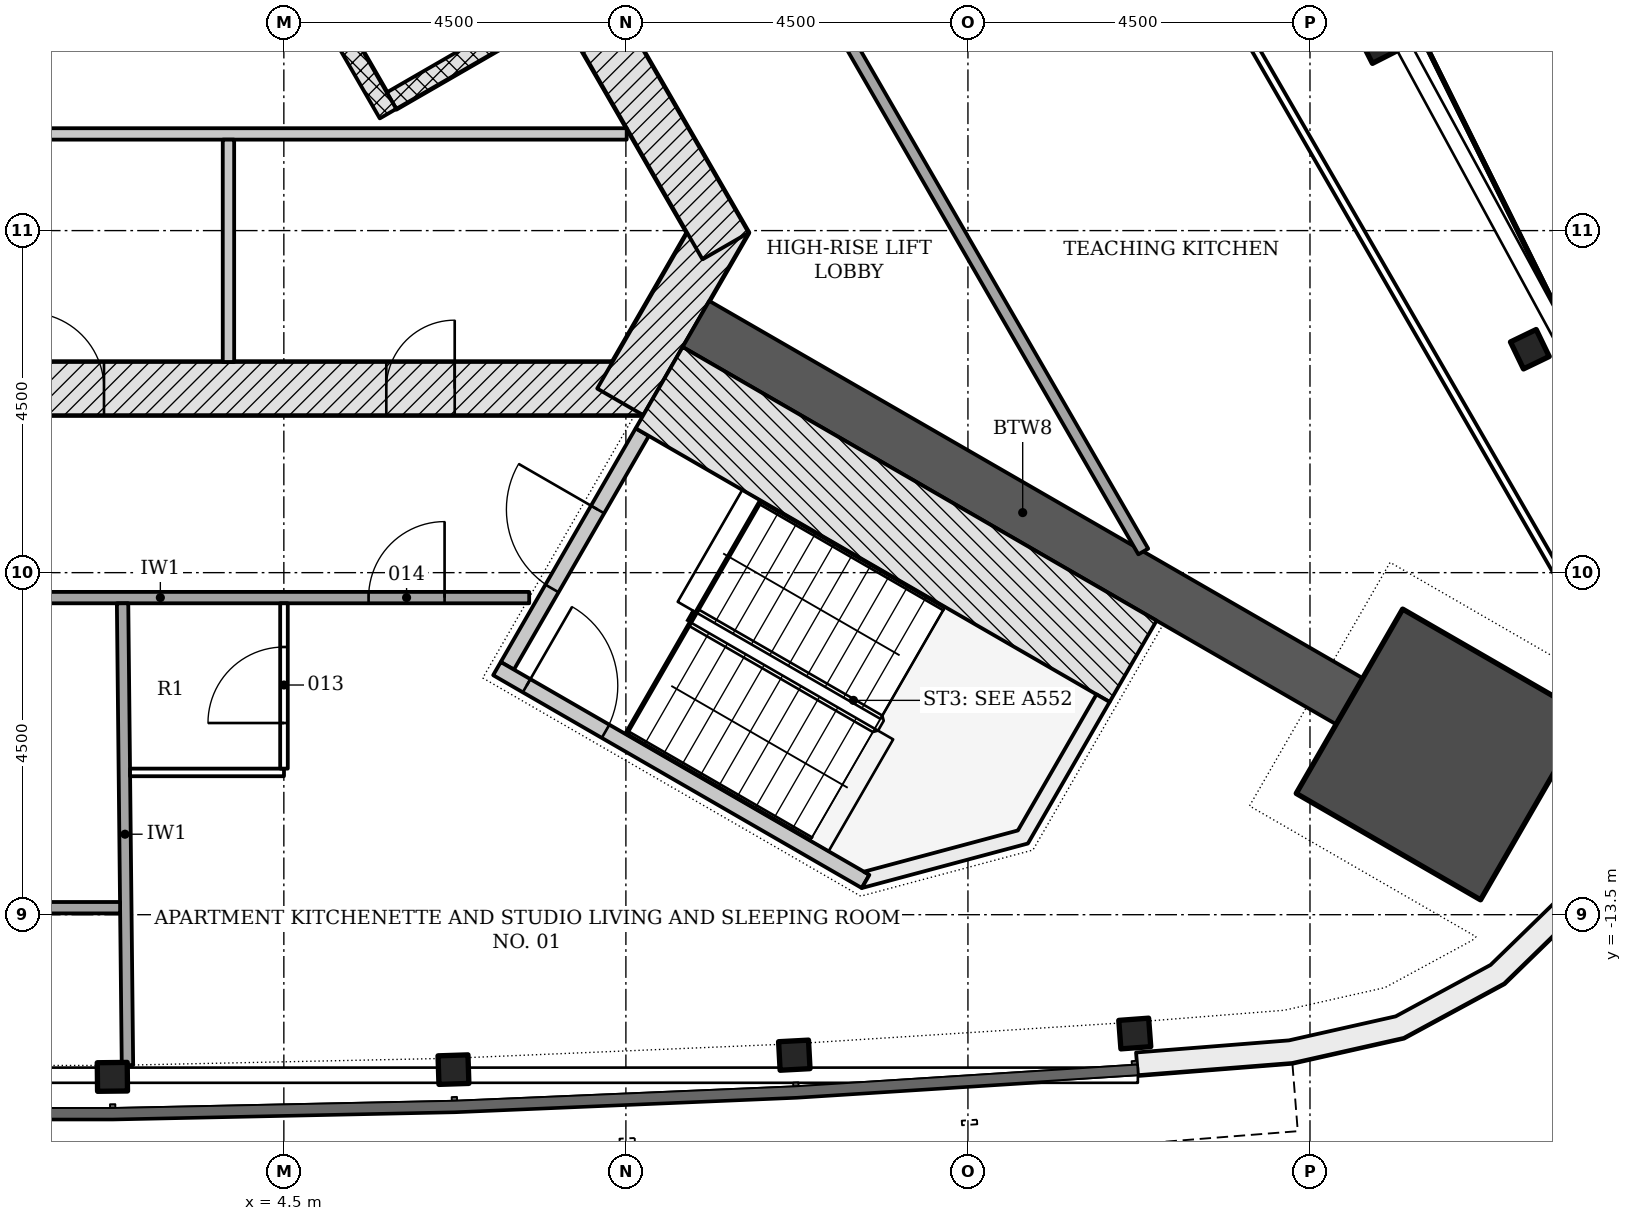
"""IFC4 building model, lengths in metres.
Left out: names, types, materials, properties, quantities, classifications, styles, units other than length and angle.
Written with IfcOpenShell. Run it as: python <this file> out.ifc"""

import sys

from ifc_helpers import new_model, si_unit, direction, frame, frame_2d, origin, origin_2d, place, context, subcontext, project, spatial, polyline, rectangle, i_section, outline, extrude, element, fill, save


model = new_model("IFC4")
c1 = context("Model", 3, precision=1e-05, world=origin(), true_north=direction((0.0, 1.0)))
c2 = subcontext(c1, "Body", "Model", "MODEL_VIEW")
j1 = project(units=[si_unit("LENGTHUNIT", "METRE"), si_unit("PLANEANGLEUNIT", "RADIAN")], contexts=[c1])
p1 = place(None, origin())
s1 = spatial("IfcSite", under=j1, at=p1, CompositionType="ELEMENT")
p2 = place(p1, origin())
s2 = spatial("IfcBuilding", under=s1, at=p2, CompositionType="ELEMENT")
p3 = place(p2, frame((0.0, 0.0, 174.3)))
s3 = spatial("IfcBuildingStorey", under=s2, at=p3, CompositionType="ELEMENT", Elevation=174.3)
p4 = place(p3, frame((-9.229, -6.578, -0.2), z_axis=(0.0, 0.0, 1.0), x_axis=(1.0, 0.0, 0.0)))
e1 = element("IfcWall", 1, at=p4, inside=s3, PredefinedType="SHEAR", context=c2, shape_type="SweptSolid", body=[
    extrude(rectangle(XDim=18.458, YDim=0.7, at=frame_2d((9.229, 0.0))), origin(), (0.0, 0.0, 1.0), 3.6),
])
p5 = place(p4, frame((7.5, 0.0, 0.2)))
e2 = element("IfcOpeningElement", 2, at=p5, cuts=e1, PredefinedType="OPENING", context=c2, shape_type="SweptSolid", body=[
    extrude(rectangle(XDim=1.0, YDim=2.1, at=frame_2d((0.5, 1.05))), frame((0.0, 0.36, 0.0), z_axis=(0.0, -1.0, 0.0), x_axis=(1.0, 0.0, 0.0)), (0.0, 0.0, 1.0), 0.72),
])
p6 = place(p4, frame((3.389, 0.0, 0.2)))
e3 = element("IfcOpeningElement", 3, at=p6, cuts=e1, PredefinedType="OPENING", context=c2, shape_type="SweptSolid", body=[
    extrude(rectangle(XDim=0.9, YDim=2.1, at=frame_2d((0.45, 1.05))), frame((0.0, 0.36, 0.0), z_axis=(0.0, -1.0, 0.0), x_axis=(1.0, 0.0, 0.0)), (0.0, 0.0, 1.0), 0.72),
])
p7 = place(p4, frame((10.363, 0.0, 0.2)))
e4 = element("IfcOpeningElement", 4, at=p7, cuts=e1, PredefinedType="OPENING", context=c2, shape_type="SweptSolid", body=[
    extrude(rectangle(XDim=1.0, YDim=2.1, at=frame_2d((0.5, 1.05))), frame((0.0, 0.36, 0.0), z_axis=(0.0, -1.0, 0.0), x_axis=(1.0, 0.0, 0.0)), (0.0, 0.0, 1.0), 0.72),
])
p8 = place(p4, frame((15.077, 0.0, 0.2)))
e5 = element("IfcOpeningElement", 5, at=p8, cuts=e1, PredefinedType="OPENING", context=c2, shape_type="SweptSolid", body=[
    extrude(rectangle(XDim=0.9, YDim=2.1, at=frame_2d((0.45, 1.05))), frame((0.0, 0.36, 0.0), z_axis=(0.0, -1.0, 0.0), x_axis=(1.0, 0.0, 0.0)), (0.0, 0.0, 1.0), 0.72),
])
p9 = place(p3, frame((8.926, -6.753, -0.2), z_axis=(0.0, 0.0, 1.0), x_axis=(0.500042739161, 0.866000726912, 0.0)))
e6 = element("IfcWall", 6, at=p9, inside=s3, PredefinedType="SHEAR", context=c2, shape_type="SweptSolid", body=[
    extrude(rectangle(XDim=2.771, YDim=0.7, at=frame_2d((1.386, 0.0))), origin(), (0.0, 0.0, 1.0), 3.6),
])
p10 = place(p3, frame((10.311, -4.703, -0.2), z_axis=(0.0, 0.0, 1.0), x_axis=(-0.500001446645, 0.866024568562, 0.0)))
e7 = element("IfcWall", 7, at=p10, inside=s3, PredefinedType="SHEAR", context=c2, shape_type="SweptSolid", body=[
    extrude(rectangle(XDim=18.458, YDim=0.7, at=frame_2d((9.229, 0.0))), origin(), (0.0, 0.0, 1.0), 3.6),
])
p11 = place(p10, frame((4.379, 0.0, 0.2)))
e8 = element("IfcOpeningElement", 8, at=p11, cuts=e7, PredefinedType="OPENING", context=c2, shape_type="SweptSolid", body=[
    extrude(rectangle(XDim=1.1, YDim=2.1, at=frame_2d((0.55, 1.05))), frame((0.0, 0.36, 0.0), z_axis=(0.0, -1.0, 0.0), x_axis=(1.0, 0.0, 0.0)), (0.0, 0.0, 1.0), 0.72),
])
p12 = place(p10, frame((6.529, 0.0, 0.2)))
e9 = element("IfcOpeningElement", 9, at=p12, cuts=e7, PredefinedType="OPENING", context=c2, shape_type="SweptSolid", body=[
    extrude(rectangle(XDim=1.1, YDim=2.1, at=frame_2d((0.55, 1.05))), frame((0.0, 0.36, 0.0), z_axis=(0.0, -1.0, 0.0), x_axis=(1.0, 0.0, 0.0)), (0.0, 0.0, 1.0), 0.72),
])
p13 = place(p10, frame((8.679, 0.0, 0.2)))
e10 = element("IfcOpeningElement", 10, at=p13, cuts=e7, PredefinedType="OPENING", context=c2, shape_type="SweptSolid", body=[
    extrude(rectangle(XDim=1.1, YDim=2.1, at=frame_2d((0.55, 1.05))), frame((0.0, 0.36, 0.0), z_axis=(0.0, -1.0, 0.0), x_axis=(1.0, 0.0, 0.0)), (0.0, 0.0, 1.0), 0.72),
])
p14 = place(p10, frame((10.829, 0.0, 0.2)))
e11 = element("IfcOpeningElement", 11, at=p14, cuts=e7, PredefinedType="OPENING", context=c2, shape_type="SweptSolid", body=[
    extrude(rectangle(XDim=1.1, YDim=2.1, at=frame_2d((0.55, 1.05))), frame((0.0, 0.36, 0.0), z_axis=(0.0, -1.0, 0.0), x_axis=(1.0, 0.0, 0.0)), (0.0, 0.0, 1.0), 0.72),
])
p15 = place(p10, frame((12.979, 0.0, 0.2)))
e12 = element("IfcOpeningElement", 12, at=p15, cuts=e7, PredefinedType="OPENING", context=c2, shape_type="SweptSolid", body=[
    extrude(rectangle(XDim=1.1, YDim=2.1, at=frame_2d((0.55, 1.05))), frame((0.0, 0.36, 0.0), z_axis=(0.0, -1.0, 0.0), x_axis=(1.0, 0.0, 0.0)), (0.0, 0.0, 1.0), 0.72),
])
p16 = place(p3, frame((9.922, -5.728, -0.2), z_axis=(0.0, 0.0, 1.0), x_axis=(0.866029553954, -0.499992811627, 0.0)))
e13 = element("IfcWall", 13, at=p16, inside=s3, PredefinedType="SHEAR", context=c2, shape_type="SweptSolid", body=[
    extrude(rectangle(XDim=9.927, YDim=0.7, at=frame_2d((4.964, 0.0))), origin(), (0.0, 0.0, 1.0), 3.6),
])
p17 = place(p3, frame((19.731, -11.392, -0.2), z_axis=(0.0, 0.0, 1.0), x_axis=(0.866025403784, -0.5, 0.0)))
e14 = element("IfcColumn", 14, at=p17, inside=s3, PredefinedType="COLUMN", context=c2, shape_type="SweptSolid", body=[
    extrude(rectangle(XDim=2.8, YDim=2.8, at=origin_2d()), origin(), (0.0, 0.0, 1.0), 3.6),
])
for number, where, z_axis, x_axis in (
    (15, (2.244, -15.633, -0.2), (0.0, 0.0, 1.0), (1.0, 0.011, 0.0)),
    (16, (6.731, -15.538, -0.2), (0.0, 0.0, 1.0), (0.999, 0.032, 0.0)),
    (17, (11.216, -15.348, -0.2), (0.0, 0.0, 1.0), (0.999, 0.053, 0.0)),
    (18, (15.695, -15.063, -0.2), (0.0, 0.0, 1.0), (0.997, 0.074, 0.0)),
    (19, (20.893, -6.061, -0.2), (0.0, 0.0, 1.0), (-0.434, 0.901, 0.0)),
    (20, (18.9, -2.039, -0.2), (0.0, 0.0, 1.0), (-0.453, 0.891, 0.0)),
):
    element("IfcColumn", number, at=place(p3, frame(where, z_axis=z_axis, x_axis=x_axis)), inside=s3, PredefinedType="COLUMN", context=c2, shape_type="SweptSolid", body=[
        extrude(i_section(OverallWidth=0.394, OverallDepth=0.376, WebThickness=0.017, FlangeThickness=0.028, FilletRadius=0.015, at=origin_2d()), origin(), (0.0, 0.0, 1.0), 3.6),
    ])
p18 = place(p3, origin())
e21 = element("IfcWall", 21, at=p18, inside=s3, PredefinedType="NOTDEFINED", context=c2, shape_type="SweptSolid", body=[
    extrude(outline(polyline([(15.736, -15.612), (17.768, -15.451), (19.234, -15.121), (20.555, -14.405), (21.632, -13.357), (22.383, -12.055), (22.753, -10.599), (22.712, -9.097), (22.265, -7.662), (21.979, -7.751), (22.413, -9.146), (22.452, -10.565), (22.103, -11.941), (21.393, -13.171), (20.376, -14.161), (19.128, -14.837), (17.723, -15.154), (15.712, -15.312), (15.736, -15.612)])), origin(), (0.0, 0.0, 1.0), 3.3),
])
p19 = place(p3, frame((8.081, -1.541, -0.2), z_axis=(0.0, 0.0, 1.0), x_axis=(-0.866022959057, -0.500004234368, 0.0)))
e22 = element("IfcWall", 22, at=p19, inside=s3, PredefinedType="PARTITIONING", context=c2, shape_type="SweptSolid", body=[
    extrude(rectangle(XDim=2.5, YDim=0.25, at=frame_2d((1.25, 0.0))), origin(), (0.0, 0.0, 1.0), 3.6),
])
p20 = place(p3, frame((5.87, -2.961, 0.0), z_axis=(0.0, 0.0, 1.0), x_axis=(-0.50000615651, 0.866021849293, 0.0)))
e23 = element("IfcWall", 23, at=p20, inside=s3, PredefinedType="PARTITIONING", context=c2, shape_type="SweptSolid", body=[
    extrude(rectangle(XDim=11.0, YDim=0.25, at=frame_2d((5.5, 0.0))), origin(), (0.0, 0.0, 1.0), 3.4),
])
p21 = place(p3, frame((-0.129, -3.228, 0.0), z_axis=(0.0, 0.0, 1.0), x_axis=(1.0, 0.0, 0.0)))
e24 = element("IfcWall", 24, at=p21, inside=s3, PredefinedType="PARTITIONING", context=c2, shape_type="SweptSolid", body=[
    extrude(rectangle(XDim=9.139, YDim=0.15, at=frame_2d((4.57, 0.0))), origin(), (0.0, 0.0, 1.0), 3.4),
])
p22 = place(p3, frame((3.771, -3.303, 0.0), z_axis=(0.0, 0.0, 1.0), x_axis=(0.0, -1.0, 0.0)))
e25 = element("IfcWall", 25, at=p22, inside=s3, PredefinedType="PARTITIONING", context=c2, shape_type="SweptSolid", body=[
    extrude(rectangle(XDim=2.925, YDim=0.15, at=frame_2d((1.462, 0.0))), origin(), (0.0, 0.0, 1.0), 3.4),
])
p23 = place(p3, frame((7.44, -10.226, -0.2), z_axis=(0.0, 0.0, 1.0), x_axis=(0.500022077904, 0.866012656725, 0.0)))
e26 = element("IfcWall", 26, at=p23, inside=s3, PredefinedType="SHEAR", context=c2, shape_type="SweptSolid", body=[
    extrude(rectangle(XDim=3.55, YDim=0.2, at=frame_2d((1.775, 0.0))), origin(), (0.0, 0.0, 1.0), 3.6),
])
p24 = place(p23, frame((1.175, 0.0, 0.2)))
e27 = element("IfcOpeningElement", 27, at=p24, cuts=e26, PredefinedType="OPENING", context=c2, shape_type="SweptSolid", body=[
    extrude(rectangle(XDim=1.2, YDim=2.1, at=frame_2d((0.6, 1.05))), frame((0.0, 0.11, 0.0), z_axis=(0.0, -1.0, 0.0), x_axis=(1.0, 0.0, 0.0)), (0.0, 0.0, 1.0), 0.22),
])
p25 = place(p3, frame((7.304, -10.262, -0.2), z_axis=(0.0, 0.0, 1.0), x_axis=(0.866026594901, -0.49999793692, 0.0)))
e28 = element("IfcWall", 28, at=p25, inside=s3, PredefinedType="SHEAR", context=c2, shape_type="SweptSolid", body=[
    extrude(rectangle(XDim=5.6, YDim=0.2, at=frame_2d((2.8, 0.0))), origin(), (0.0, 0.0, 1.0), 3.6),
])
p26 = place(p25, frame((0.45, 0.0, 0.2)))
e29 = element("IfcOpeningElement", 29, at=p26, cuts=e28, PredefinedType="OPENING", context=c2, shape_type="SweptSolid", body=[
    extrude(rectangle(XDim=1.2, YDim=2.1, at=frame_2d((0.6, 1.05))), frame((0.0, 0.11, 0.0), z_axis=(0.0, -1.0, 0.0), x_axis=(1.0, 0.0, 0.0)), (0.0, 0.0, 1.0), 0.22),
])
p27 = place(p3, frame((9.438, -6.566, -0.2), z_axis=(0.0, 0.0, 1.0), x_axis=(0.866026919366, -0.499997374926, 0.0)))
e30 = element("IfcWall", 30, at=p27, inside=s3, PredefinedType="SHEAR", context=c2, shape_type="SweptSolid", body=[
    extrude(rectangle(XDim=7.2, YDim=1.236, at=frame_2d((3.6, 0.0))), origin(), (0.0, 0.0, 1.0), 3.6),
])
p28 = place(p3, frame((0.0, 0.0, -0.2)))
e31 = element("IfcWall", 31, at=p28, inside=s3, PredefinedType="SHEAR", context=c2, shape_type="SweptSolid", body=[
    extrude(outline(polyline([(12.104, -13.149), (14.289, -12.563), (15.364, -10.701), (15.191, -10.601), (14.157, -12.392), (12.132, -12.934), (12.204, -12.976), (12.204, -12.976), (12.204, -12.976), (12.204, -12.976), (12.204, -12.976), (12.204, -12.976), (12.204, -12.976), (12.204, -12.976), (12.204, -12.976), (12.204, -12.976), (12.204, -12.976), (12.204, -12.976), (12.204, -12.976), (12.204, -12.976), (12.204, -12.976), (12.204, -12.976), (12.204, -12.976), (12.104, -13.149)])), origin(), (0.0, 0.0, 1.0), 3.6),
])
p29 = place(p3, frame((15.807, -8.722, 0.0), z_axis=(0.0, 0.0, 1.0), x_axis=(-0.500001078133, 0.866024781323, 0.0)))
e32 = element("IfcWall", 32, at=p29, inside=s3, PredefinedType="PARTITIONING", context=c2, shape_type="SweptSolid", body=[
    extrude(rectangle(XDim=23.185, YDim=0.15, at=frame_2d((11.592, 0.0))), origin(), (0.0, 0.0, 1.0), 2.847),
])
p30 = place(p29, frame((10.551, 0.0, 0.0)))
e33 = element("IfcOpeningElement", 33, at=p30, cuts=e32, PredefinedType="OPENING", context=c2, shape_type="SweptSolid", body=[
    extrude(rectangle(XDim=1.5, YDim=2.1, at=frame_2d((0.75, 1.05))), frame((0.0, 0.085, 0.0), z_axis=(0.0, -1.0, 0.0), x_axis=(1.0, 0.0, 0.0)), (0.0, 0.0, 1.0), 0.17),
])
p31 = place(p29, frame((17.335, 0.0, 0.0)))
e34 = element("IfcOpeningElement", 34, at=p31, cuts=e32, PredefinedType="OPENING", context=c2, shape_type="SweptSolid", body=[
    extrude(rectangle(XDim=1.0, YDim=2.1, at=frame_2d((0.5, 1.05))), frame((0.0, 0.085, 0.0), z_axis=(0.0, -1.0, 0.0), x_axis=(1.0, 0.0, 0.0)), (0.0, 0.0, 1.0), 0.17),
])
p32 = place(p3, frame((22.363, -10.917, 0.0), z_axis=(0.0, 0.0, 1.0), x_axis=(-0.500007103281, 0.866021302664, 0.0)))
e35 = element("IfcWall", 35, at=p32, inside=s3, PredefinedType="PARTITIONING", context=c2, shape_type="SweptSolid", body=[
    extrude(rectangle(XDim=14.106, YDim=0.1, at=frame_2d((7.053, 0.0))), origin(), (0.0, 0.0, 1.0), 2.847),
])
p33 = place(p3, frame((-1.977, -9.328, 0.0), z_axis=(0.0, 0.0, 1.0), x_axis=(1.0, 0.0, 0.0)))
e36 = element("IfcWall", 36, at=p33, inside=s3, PredefinedType="PARTITIONING", context=c2, shape_type="SweptSolid", body=[
    extrude(rectangle(XDim=9.705, YDim=0.15, at=frame_2d((4.853, 0.0))), origin(), (0.0, 0.0, 1.0), 2.847),
])
p34 = place(p33, frame((1.702, 0.0, 0.0)))
e37 = element("IfcOpeningElement", 37, at=p34, cuts=e36, PredefinedType="OPENING", context=c2, shape_type="SweptSolid", body=[
    extrude(rectangle(XDim=1.0, YDim=2.1, at=frame_2d((0.5, 1.05))), frame((0.0, 0.085, 0.0), z_axis=(0.0, -1.0, 0.0), x_axis=(1.0, 0.0, 0.0)), (0.0, 0.0, 1.0), 0.17),
])
p35 = place(p33, frame((7.592, 0.0, 0.0)))
e38 = element("IfcOpeningElement", 38, at=p35, cuts=e36, PredefinedType="OPENING", context=c2, shape_type="SweptSolid", body=[
    extrude(rectangle(XDim=1.0, YDim=2.1, at=frame_2d((0.5, 1.05))), frame((0.0, 0.085, 0.0), z_axis=(0.0, -1.0, 0.0), x_axis=(1.0, 0.0, 0.0)), (0.0, 0.0, 1.0), 0.17),
])
p36 = place(p3, frame((2.443, -15.479, 0.0), z_axis=(0.0, 0.0, 1.0), x_axis=(-0.010607777316, 0.999943735947, 0.0)))
e39 = element("IfcWall", 39, at=p36, inside=s3, PredefinedType="PARTITIONING", context=c2, shape_type="SweptSolid", body=[
    extrude(rectangle(XDim=6.076, YDim=0.15, at=frame_2d((3.038, 0.0))), origin(), (0.0, 0.0, 1.0), 3.4),
])
p37 = place(p3, frame((-4.248, -13.408, 0.0), z_axis=(0.0, 0.0, 1.0), x_axis=(1.0, 0.0, 0.0)))
e40 = element("IfcWall", 40, at=p37, inside=s3, PredefinedType="PARTITIONING", context=c2, shape_type="SweptSolid", body=[
    extrude(rectangle(XDim=6.594, YDim=0.15, at=frame_2d((3.297, 0.0))), origin(), (0.0, 0.0, 1.0), 2.847),
])
p38 = place(p37, frame((0.625, 0.0, 0.0)))
e41 = element("IfcOpeningElement", 41, at=p38, cuts=e40, PredefinedType="OPENING", context=c2, shape_type="SweptSolid", body=[
    extrude(rectangle(XDim=1.0, YDim=2.1, at=frame_2d((0.5, 1.05))), frame((0.0, 0.085, 0.0), z_axis=(0.0, -1.0, 0.0), x_axis=(1.0, 0.0, 0.0)), (0.0, 0.0, 1.0), 0.17),
])
p39 = place(p3, frame((2.477, -11.628, 0.0), z_axis=(0.0, 0.0, 1.0), x_axis=(1.0, 0.0, 0.0)))
e42 = element("IfcWall", 42, at=p39, inside=s3, PredefinedType="PARTITIONING", context=c2, shape_type="SweptSolid", body=[
    extrude(rectangle(XDim=2.025, YDim=0.1, at=frame_2d((1.012, 0.0))), origin(), (0.0, 0.0, 1.0), 3.4),
])
p40 = place(p3, frame((4.502, -11.578, 0.0), z_axis=(0.0, 0.0, 1.0), x_axis=(0.0, 1.0, 0.0)))
e43 = element("IfcWall", 43, at=p40, inside=s3, PredefinedType="PARTITIONING", context=c2, shape_type="SweptSolid", body=[
    extrude(rectangle(XDim=2.175, YDim=0.1, at=frame_2d((1.087, 0.0))), origin(), (0.0, 0.0, 1.0), 3.4),
])
p41 = place(p40, frame((0.6, 0.0, 0.0)))
e44 = element("IfcOpeningElement", 44, at=p41, cuts=e43, PredefinedType="OPENING", context=c2, shape_type="SweptSolid", body=[
    extrude(rectangle(XDim=1.0, YDim=2.1, at=frame_2d((0.5, 1.05))), frame((0.0, 0.06, 0.0), z_axis=(0.0, -1.0, 0.0), x_axis=(1.0, 0.0, 0.0)), (0.0, 0.0, 1.0), 0.12),
])
p42 = place(p7, origin())
e45 = element("IfcDoor", 45, at=p42, inside=s3, OperationType="SINGLE_SWING_LEFT", PredefinedType="DOOR", context=c2, shape_type="SweptSolid", body=[
    extrude(rectangle(XDim=1.0, YDim=2.1, at=frame_2d((0.5, 1.05))), frame((0.0, 0.075, 0.0), z_axis=(0.0, -1.0, 0.0), x_axis=(1.0, 0.0, 0.0)), (0.0, 0.0, 1.0), 0.15),
])
fill(e4, e45)
p43 = place(p8, origin())
e46 = element("IfcDoor", 46, at=p43, inside=s3, OperationType="SINGLE_SWING_RIGHT", PredefinedType="DOOR", context=c2, shape_type="SweptSolid", body=[
    extrude(rectangle(XDim=0.9, YDim=2.1, at=frame_2d((0.45, 1.05))), frame((0.0, 0.075, 0.0), z_axis=(0.0, -1.0, 0.0), x_axis=(1.0, 0.0, 0.0)), (0.0, 0.0, 1.0), 0.15),
])
fill(e5, e46)
p44 = place(p24, origin())
e47 = element("IfcDoor", 47, at=p44, inside=s3, OperationType="SINGLE_SWING_RIGHT", PredefinedType="DOOR", context=c2, shape_type="SweptSolid", body=[
    extrude(rectangle(XDim=1.2, YDim=2.1, at=frame_2d((0.6, 1.05))), frame((0.0, 0.025, 0.0), z_axis=(0.0, -1.0, 0.0), x_axis=(1.0, 0.0, 0.0)), (0.0, 0.0, 1.0), 0.05),
])
fill(e27, e47)
p45 = place(p26, origin())
e48 = element("IfcDoor", 48, at=p45, inside=s3, OperationType="SINGLE_SWING_LEFT", PredefinedType="DOOR", context=c2, shape_type="SweptSolid", body=[
    extrude(rectangle(XDim=1.2, YDim=2.1, at=frame_2d((0.6, 1.05))), frame((0.0, 0.025, 0.0), z_axis=(0.0, -1.0, 0.0), x_axis=(1.0, 0.0, 0.0)), (0.0, 0.0, 1.0), 0.05),
])
fill(e29, e48)
p46 = place(p41, origin())
e49 = element("IfcDoor", 49, at=p46, inside=s3, OperationType="SINGLE_SWING_LEFT", PredefinedType="DOOR", context=c2, shape_type="SweptSolid", body=[
    extrude(rectangle(XDim=1.0, YDim=2.1, at=frame_2d((0.5, 1.05))), frame((0.0, 0.025, 0.0), z_axis=(0.0, -1.0, 0.0), x_axis=(1.0, 0.0, 0.0)), (0.0, 0.0, 1.0), 0.05),
])
fill(e44, e49)
p47 = place(p35, origin())
e50 = element("IfcDoor", 50, at=p47, inside=s3, OperationType="SINGLE_SWING_RIGHT", PredefinedType="DOOR", context=c2, shape_type="SweptSolid", body=[
    extrude(rectangle(XDim=1.0, YDim=2.1, at=frame_2d((0.5, 1.05))), frame((0.0, 0.025, 0.0), z_axis=(0.0, -1.0, 0.0), x_axis=(1.0, 0.0, 0.0)), (0.0, 0.0, 1.0), 0.05),
])
fill(e38, e50)
save(model, sys.argv[1])
